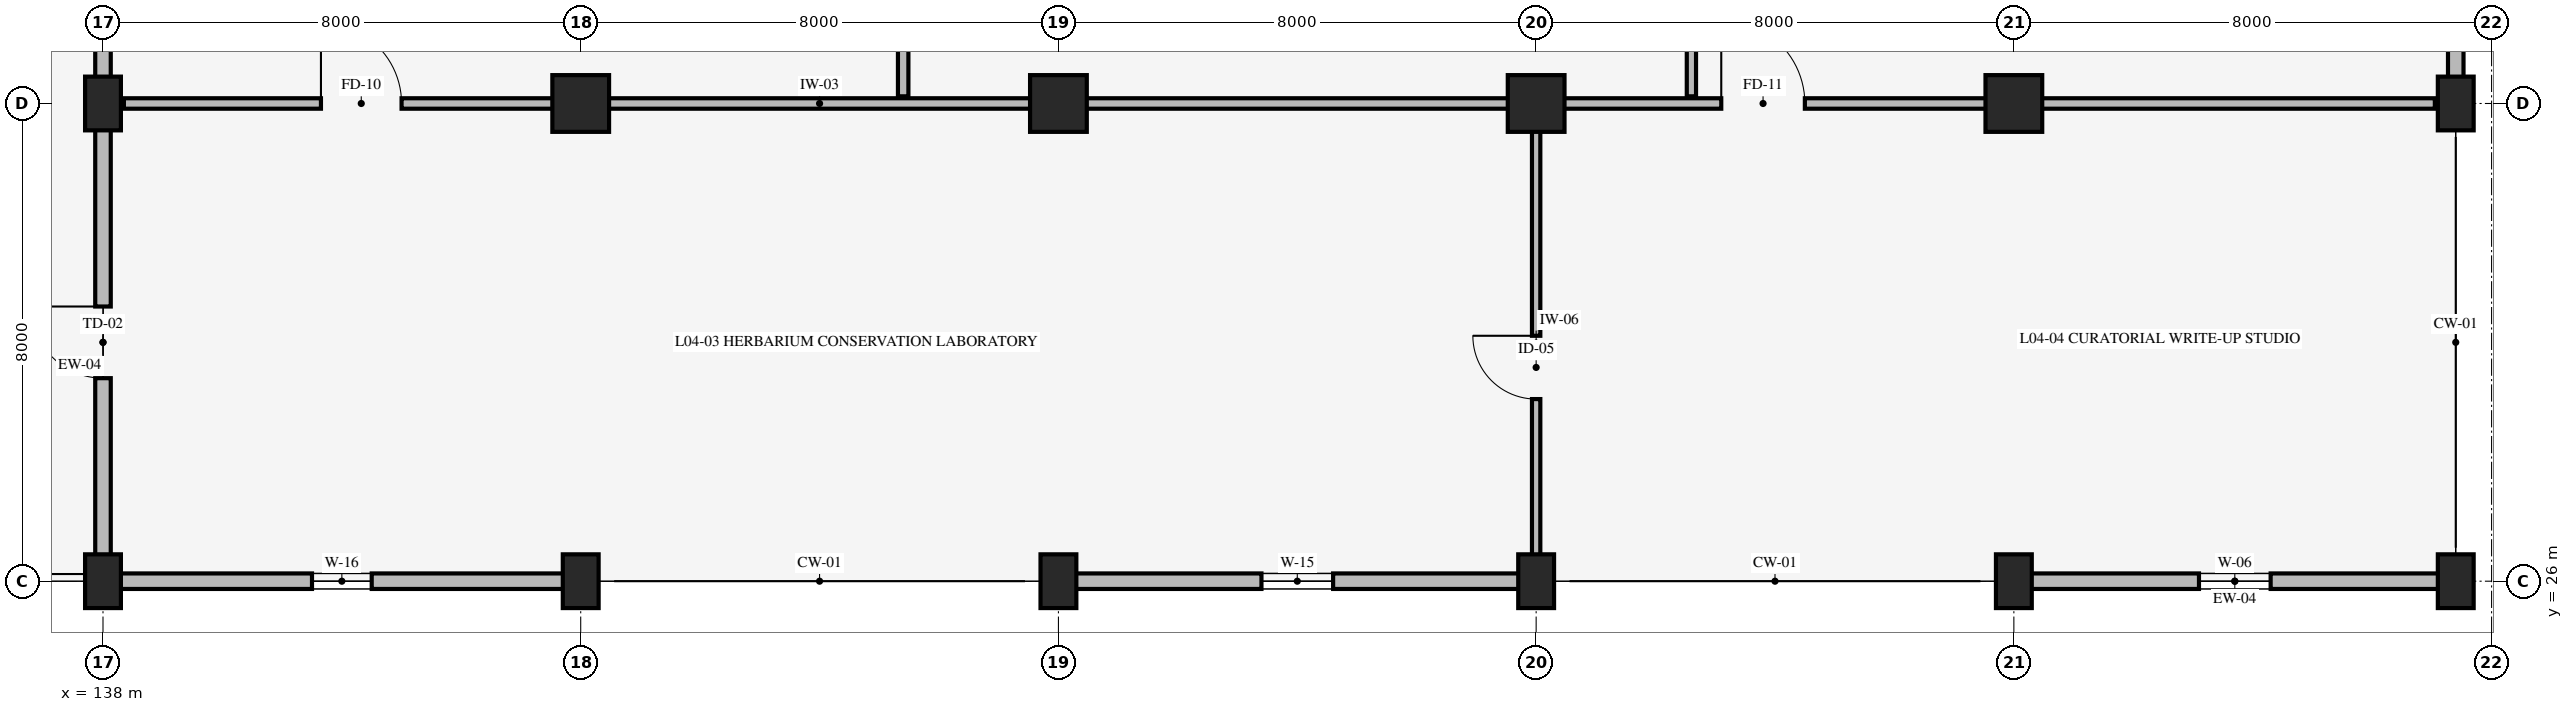
"""IFC4 building model, lengths in metres.
Left out: names, types, materials, properties, quantities, classifications, styles, units other than length and angle.
Written with IfcOpenShell. Run it as: python <this file> out.ifc"""

import sys

from ifc_helpers import new_model, si_unit, direction, frame, frame_2d, origin, origin_2d, place, context, subcontext, project, spatial, rectangle, extrude, element, fill, save


model = new_model("IFC4")
c1 = context("Model", 3, precision=1e-05, world=origin(), true_north=direction((0.0, 1.0)))
c2 = subcontext(c1, "Body", "Model", "MODEL_VIEW")
j1 = project(units=[si_unit("LENGTHUNIT", "METRE"), si_unit("PLANEANGLEUNIT", "RADIAN")], contexts=[c1])
p1 = place(None, origin())
s1 = spatial("IfcSite", under=j1, at=p1, CompositionType="ELEMENT")
p2 = place(p1, origin())
s2 = spatial("IfcBuilding", under=s1, at=p2, CompositionType="ELEMENT")
p3 = place(p2, frame((0.0, 0.0, 15.0)))
s3 = spatial("IfcBuildingStorey", under=s2, at=p3, CompositionType="ELEMENT", Elevation=15.0)
for number, where, z_axis, x_axis in (
    (1, (138.0, 26.0, 0.0), (0.0, 0.0, 1.0), (1.0, 0.0, 0.0)),
    (2, (138.0, 34.0, 0.0), (0.0, 0.0, 1.0), (1.0, 0.0, 0.0)),
    (3, (146.0, 26.0, 0.0), (0.0, 0.0, 1.0), (1.0, 0.0, 0.0)),
):
    element("IfcColumn", number, at=place(p3, frame(where, z_axis=z_axis, x_axis=x_axis)), inside=s3, PredefinedType="COLUMN", context=c2, shape_type="SweptSolid", body=[
        extrude(rectangle(XDim=0.6, YDim=0.9, at=origin_2d()), origin(), (0.0, 0.0, 1.0), 4.2),
    ])
p4 = place(p3, frame((146.0, 34.0, 0.0), z_axis=(0.0, 0.0, 1.0), x_axis=(1.0, 0.0, 0.0)))
e4 = element("IfcColumn", 4, at=p4, inside=s3, PredefinedType="COLUMN", context=c2, shape_type="SweptSolid", body=[
    extrude(rectangle(XDim=0.95, YDim=0.95, at=origin_2d()), origin(), (0.0, 0.0, 1.0), 4.2),
])
p5 = place(p3, frame((154.0, 26.0, 0.0), z_axis=(0.0, 0.0, 1.0), x_axis=(1.0, 0.0, 0.0)))
e5 = element("IfcColumn", 5, at=p5, inside=s3, PredefinedType="COLUMN", context=c2, shape_type="SweptSolid", body=[
    extrude(rectangle(XDim=0.6, YDim=0.9, at=origin_2d()), origin(), (0.0, 0.0, 1.0), 4.2),
])
p6 = place(p3, frame((154.0, 34.0, 0.0), z_axis=(0.0, 0.0, 1.0), x_axis=(1.0, 0.0, 0.0)))
e6 = element("IfcColumn", 6, at=p6, inside=s3, PredefinedType="COLUMN", context=c2, shape_type="SweptSolid", body=[
    extrude(rectangle(XDim=0.95, YDim=0.95, at=origin_2d()), origin(), (0.0, 0.0, 1.0), 4.2),
])
p7 = place(p3, frame((162.0, 26.0, 0.0), z_axis=(0.0, 0.0, 1.0), x_axis=(1.0, 0.0, 0.0)))
e7 = element("IfcColumn", 7, at=p7, inside=s3, PredefinedType="COLUMN", context=c2, shape_type="SweptSolid", body=[
    extrude(rectangle(XDim=0.6, YDim=0.9, at=origin_2d()), origin(), (0.0, 0.0, 1.0), 4.2),
])
p8 = place(p3, frame((162.0, 34.0, 0.0), z_axis=(0.0, 0.0, 1.0), x_axis=(1.0, 0.0, 0.0)))
e8 = element("IfcColumn", 8, at=p8, inside=s3, PredefinedType="COLUMN", context=c2, shape_type="SweptSolid", body=[
    extrude(rectangle(XDim=0.95, YDim=0.95, at=origin_2d()), origin(), (0.0, 0.0, 1.0), 4.2),
])
p9 = place(p3, frame((170.0, 26.0, 0.0), z_axis=(0.0, 0.0, 1.0), x_axis=(1.0, 0.0, 0.0)))
e9 = element("IfcColumn", 9, at=p9, inside=s3, PredefinedType="COLUMN", context=c2, shape_type="SweptSolid", body=[
    extrude(rectangle(XDim=0.6, YDim=0.9, at=origin_2d()), origin(), (0.0, 0.0, 1.0), 4.2),
])
p10 = place(p3, frame((170.0, 34.0, 0.0), z_axis=(0.0, 0.0, 1.0), x_axis=(1.0, 0.0, 0.0)))
e10 = element("IfcColumn", 10, at=p10, inside=s3, PredefinedType="COLUMN", context=c2, shape_type="SweptSolid", body=[
    extrude(rectangle(XDim=0.95, YDim=0.95, at=origin_2d()), origin(), (0.0, 0.0, 1.0), 4.2),
])
for number, where, z_axis, x_axis in (
    (11, (177.4, 26.0, 0.0), (0.0, 0.0, 1.0), (1.0, 0.0, 0.0)),
    (12, (177.4, 34.0, 0.0), (0.0, 0.0, 1.0), (1.0, 0.0, 0.0)),
):
    element("IfcColumn", number, at=place(p3, frame(where, z_axis=z_axis, x_axis=x_axis)), inside=s3, PredefinedType="COLUMN", context=c2, shape_type="SweptSolid", body=[
        extrude(rectangle(XDim=0.6, YDim=0.9, at=origin_2d()), origin(), (0.0, 0.0, 1.0), 4.2),
    ])
p11 = place(p3, frame((177.4, 26.0, 0.0), z_axis=(0.0, 0.0, 1.0), x_axis=(-1.0, 0.0, 0.0)))
e13 = element("IfcWall", 13, at=p11, inside=s3, PredefinedType="STANDARD", context=c2, shape_type="SweptSolid", body=[
    extrude(rectangle(XDim=7.4, YDim=0.26, at=frame_2d((3.7, 0.0))), origin(), (0.0, 0.0, 1.0), 3.03),
])
p12 = place(p11, frame((3.1, 0.0, 0.85)))
e14 = element("IfcOpeningElement", 14, at=p12, cuts=e13, PredefinedType="OPENING", context=c2, shape_type="SweptSolid", body=[
    extrude(rectangle(XDim=1.2, YDim=1.2, at=frame_2d((0.6, 0.6))), frame((0.0, 0.14, 0.0), z_axis=(0.0, -1.0, 0.0), x_axis=(1.0, 0.0, 0.0)), (0.0, 0.0, 1.0), 0.28),
])
p13 = place(p3, frame((162.0, 26.0, 0.0), z_axis=(0.0, 0.0, 1.0), x_axis=(-1.0, 0.0, 0.0)))
e15 = element("IfcWall", 15, at=p13, inside=s3, PredefinedType="STANDARD", context=c2, shape_type="SweptSolid", body=[
    extrude(rectangle(XDim=8.0, YDim=0.26, at=frame_2d((4.0, 0.0))), origin(), (0.0, 0.0, 1.0), 3.03),
])
p14 = place(p13, frame((3.4, 0.0, 0.85)))
e16 = element("IfcOpeningElement", 16, at=p14, cuts=e15, PredefinedType="OPENING", context=c2, shape_type="SweptSolid", body=[
    extrude(rectangle(XDim=1.2, YDim=1.8, at=frame_2d((0.6, 0.9))), frame((0.0, 0.14, 0.0), z_axis=(0.0, -1.0, 0.0), x_axis=(1.0, 0.0, 0.0)), (0.0, 0.0, 1.0), 0.28),
])
p15 = place(p3, frame((146.0, 26.0, 0.0), z_axis=(0.0, 0.0, 1.0), x_axis=(-1.0, 0.0, 0.0)))
e17 = element("IfcWall", 17, at=p15, inside=s3, PredefinedType="STANDARD", context=c2, shape_type="SweptSolid", body=[
    extrude(rectangle(XDim=8.0, YDim=0.26, at=frame_2d((4.0, 0.0))), origin(), (0.0, 0.0, 1.0), 3.33),
])
p16 = place(p15, frame((3.5, 0.0, 0.85)))
e18 = element("IfcOpeningElement", 18, at=p16, cuts=e17, PredefinedType="OPENING", context=c2, shape_type="SweptSolid", body=[
    extrude(rectangle(XDim=1.0, YDim=1.5, at=frame_2d((0.5, 0.75))), frame((0.0, 0.14, 0.0), z_axis=(0.0, -1.0, 0.0), x_axis=(1.0, 0.0, 0.0)), (0.0, 0.0, 1.0), 0.28),
])
p17 = place(p3, frame((138.0, 26.0, 0.0), z_axis=(0.0, 0.0, 1.0), x_axis=(0.0, 1.0, 0.0)))
e19 = element("IfcWall", 19, at=p17, inside=s3, PredefinedType="STANDARD", context=c2, shape_type="SweptSolid", body=[
    extrude(rectangle(XDim=8.0, YDim=0.26, at=frame_2d((4.0, 0.0))), origin(), (0.0, 0.0, 1.0), 3.08),
])
p18 = place(p17, frame((3.4, 0.0, 0.0)))
e20 = element("IfcOpeningElement", 20, at=p18, cuts=e19, PredefinedType="OPENING", context=c2, shape_type="SweptSolid", body=[
    extrude(rectangle(XDim=1.2, YDim=2.2, at=frame_2d((0.6, 1.1))), frame((0.0, 0.14, 0.0), z_axis=(0.0, -1.0, 0.0), x_axis=(1.0, 0.0, 0.0)), (0.0, 0.0, 1.0), 0.28),
])
p19 = place(p3, frame((138.0, 34.0, 0.0), z_axis=(0.0, 0.0, 1.0), x_axis=(0.0, 1.0, 0.0)))
e21 = element("IfcWall", 21, at=p19, inside=s3, PredefinedType="STANDARD", context=c2, shape_type="SweptSolid", body=[
    extrude(rectangle(XDim=8.0, YDim=0.26, at=frame_2d((4.0, 0.0))), origin(), (0.0, 0.0, 1.0), 3.08),
])
p20 = place(p19, frame((2.75, 0.0, 0.85)))
e22 = element("IfcOpeningElement", 22, at=p20, cuts=e21, PredefinedType="OPENING", context=c2, shape_type="SweptSolid", body=[
    extrude(rectangle(XDim=2.5, YDim=1.8, at=frame_2d((1.25, 0.9))), frame((0.0, 0.14, 0.0), z_axis=(0.0, -1.0, 0.0), x_axis=(1.0, 0.0, 0.0)), (0.0, 0.0, 1.0), 0.28),
])
p21 = place(p3, frame((177.4, 42.0, 0.0), z_axis=(0.0, 0.0, 1.0), x_axis=(0.0, -1.0, 0.0)))
e23 = element("IfcWall", 23, at=p21, inside=s3, PredefinedType="STANDARD", context=c2, shape_type="SweptSolid", body=[
    extrude(rectangle(XDim=8.0, YDim=0.26, at=frame_2d((4.0, 0.0))), origin(), (0.0, 0.0, 1.0), 3.08),
])
p22 = place(p21, frame((2.95, 0.0, 0.85)))
e24 = element("IfcOpeningElement", 24, at=p22, cuts=e23, PredefinedType="OPENING", context=c2, shape_type="SweptSolid", body=[
    extrude(rectangle(XDim=2.1, YDim=1.6, at=frame_2d((1.05, 0.8))), frame((0.0, 0.14, 0.0), z_axis=(0.0, -1.0, 0.0), x_axis=(1.0, 0.0, 0.0)), (0.0, 0.0, 1.0), 0.28),
])
p23 = place(p3, frame((151.4, 34.12, 0.0), z_axis=(0.0, 0.0, 1.0), x_axis=(0.0, 1.0, 0.0)))
e25 = element("IfcWall", 25, at=p23, inside=s3, PredefinedType="STANDARD", context=c2, shape_type="SweptSolid", body=[
    extrude(rectangle(XDim=19.76, YDim=0.175, at=frame_2d((9.88, 0.0))), origin(), (0.0, 0.0, 1.0), 3.9),
])
p24 = place(p23, frame((9.305, 0.0, 0.0)))
e26 = element("IfcOpeningElement", 26, at=p24, cuts=e25, PredefinedType="OPENING", context=c2, shape_type="SweptSolid", body=[
    extrude(rectangle(XDim=1.15, YDim=2.1, at=frame_2d((0.575, 1.05))), frame((0.0, 0.098, 0.0), z_axis=(0.0, -1.0, 0.0), x_axis=(1.0, 0.0, 0.0)), (0.0, 0.0, 1.0), 0.195),
])
p25 = place(p3, frame((164.6, 34.12, 0.0), z_axis=(0.0, 0.0, 1.0), x_axis=(0.0, 1.0, 0.0)))
e27 = element("IfcWall", 27, at=p25, inside=s3, PredefinedType="STANDARD", context=c2, shape_type="SweptSolid", body=[
    extrude(rectangle(XDim=15.8, YDim=0.155, at=frame_2d((7.9, 0.0))), origin(), (0.0, 0.0, 1.0), 3.9),
])
p26 = place(p25, frame((7.225, 0.0, 0.0)))
e28 = element("IfcOpeningElement", 28, at=p26, cuts=e27, PredefinedType="OPENING", context=c2, shape_type="SweptSolid", body=[
    extrude(rectangle(XDim=1.35, YDim=2.15, at=frame_2d((0.675, 1.075))), frame((0.0, 0.087, 0.0), z_axis=(0.0, -1.0, 0.0), x_axis=(1.0, 0.0, 0.0)), (0.0, 0.0, 1.0), 0.175),
])
p27 = place(p3, frame((138.35, 34.0, 0.0), z_axis=(0.0, 0.0, 1.0), x_axis=(1.0, 0.0, 0.0)))
e29 = element("IfcWall", 29, at=p27, inside=s3, PredefinedType="STANDARD", context=c2, shape_type="SweptSolid", body=[
    extrude(rectangle(XDim=23.3, YDim=0.175, at=frame_2d((11.65, 0.0))), origin(), (0.0, 0.0, 1.0), 3.03),
])
p28 = place(p27, frame((3.3, 0.0, 0.0)))
e30 = element("IfcOpeningElement", 30, at=p28, cuts=e29, PredefinedType="OPENING", context=c2, shape_type="SweptSolid", body=[
    extrude(rectangle(XDim=1.35, YDim=2.15, at=frame_2d((0.675, 1.075))), frame((0.0, 0.098, 0.0), z_axis=(0.0, -1.0, 0.0), x_axis=(1.0, 0.0, 0.0)), (0.0, 0.0, 1.0), 0.195),
])
p29 = place(p3, frame((162.0, 26.05, 0.0), z_axis=(0.0, 0.0, 1.0), x_axis=(0.0, 1.0, 0.0)))
e31 = element("IfcWall", 31, at=p29, inside=s3, PredefinedType="STANDARD", context=c2, shape_type="SweptSolid", body=[
    extrude(rectangle(XDim=7.83, YDim=0.14, at=frame_2d((3.915, 0.0))), origin(), (0.0, 0.0, 1.0), 3.08),
])
p30 = place(p29, frame((3.0, 0.0, 0.0)))
e32 = element("IfcOpeningElement", 32, at=p30, cuts=e31, PredefinedType="OPENING", context=c2, shape_type="SweptSolid", body=[
    extrude(rectangle(XDim=1.06, YDim=2.12, at=frame_2d((0.53, 1.06))), frame((0.0, 0.08, 0.0), z_axis=(0.0, -1.0, 0.0), x_axis=(1.0, 0.0, 0.0)), (0.0, 0.0, 1.0), 0.16),
])
p31 = place(p3, frame((162.35, 34.0, 0.0), z_axis=(0.0, 0.0, 1.0), x_axis=(1.0, 0.0, 0.0)))
e33 = element("IfcWall", 33, at=p31, inside=s3, PredefinedType="STANDARD", context=c2, shape_type="SweptSolid", body=[
    extrude(rectangle(XDim=14.7, YDim=0.175, at=frame_2d((7.35, 0.0))), origin(), (0.0, 0.0, 1.0), 3.03),
])
p32 = place(p31, frame((2.75, 0.0, 0.0)))
e34 = element("IfcOpeningElement", 34, at=p32, cuts=e33, PredefinedType="OPENING", context=c2, shape_type="SweptSolid", body=[
    extrude(rectangle(XDim=1.4, YDim=2.2, at=frame_2d((0.7, 1.1))), frame((0.0, 0.098, 0.0), z_axis=(0.0, -1.0, 0.0), x_axis=(1.0, 0.0, 0.0)), (0.0, 0.0, 1.0), 0.195),
])
p33 = place(p12, origin())
e35 = element("IfcWindow", 35, at=p33, inside=s3, PartitioningType="SINGLE_PANEL", PredefinedType="WINDOW", context=c2, shape_type="SweptSolid", body=[
    extrude(rectangle(XDim=1.2, YDim=1.2, at=frame_2d((0.6, 0.6))), frame((0.0, 0.03, 0.0), z_axis=(0.0, -1.0, 0.0), x_axis=(1.0, 0.0, 0.0)), (0.0, 0.0, 1.0), 0.06),
])
fill(e14, e35)
p34 = place(p14, origin())
e36 = element("IfcWindow", 36, at=p34, inside=s3, PartitioningType="SINGLE_PANEL", PredefinedType="WINDOW", context=c2, shape_type="SweptSolid", body=[
    extrude(rectangle(XDim=1.2, YDim=1.8, at=frame_2d((0.6, 0.9))), frame((0.0, 0.03, 0.0), z_axis=(0.0, -1.0, 0.0), x_axis=(1.0, 0.0, 0.0)), (0.0, 0.0, 1.0), 0.06),
])
fill(e16, e36)
p35 = place(p16, origin())
e37 = element("IfcWindow", 37, at=p35, inside=s3, PartitioningType="SINGLE_PANEL", PredefinedType="WINDOW", context=c2, shape_type="SweptSolid", body=[
    extrude(rectangle(XDim=1.0, YDim=1.5, at=frame_2d((0.5, 0.75))), frame((0.0, 0.03, 0.0), z_axis=(0.0, -1.0, 0.0), x_axis=(1.0, 0.0, 0.0)), (0.0, 0.0, 1.0), 0.06),
])
fill(e18, e37)
p36 = place(p18, origin())
e38 = element("IfcDoor", 38, at=p36, inside=s3, OperationType="SINGLE_SWING_RIGHT", PredefinedType="DOOR", context=c2, shape_type="SweptSolid", body=[
    extrude(rectangle(XDim=1.2, YDim=2.2, at=frame_2d((0.6, 1.1))), frame((0.0, 0.025, 0.0), z_axis=(0.0, -1.0, 0.0), x_axis=(1.0, 0.0, 0.0)), (0.0, 0.0, 1.0), 0.05),
])
fill(e20, e38)
p37 = place(p28, origin())
e39 = element("IfcDoor", 39, at=p37, inside=s3, OperationType="SINGLE_SWING_LEFT", PredefinedType="DOOR", context=c2, shape_type="SweptSolid", body=[
    extrude(rectangle(XDim=1.35, YDim=2.15, at=frame_2d((0.675, 1.075))), frame((0.0, 0.025, 0.0), z_axis=(0.0, -1.0, 0.0), x_axis=(1.0, 0.0, 0.0)), (0.0, 0.0, 1.0), 0.05),
])
fill(e30, e39)
p38 = place(p30, origin())
e40 = element("IfcDoor", 40, at=p38, inside=s3, OperationType="SINGLE_SWING_RIGHT", PredefinedType="DOOR", context=c2, shape_type="SweptSolid", body=[
    extrude(rectangle(XDim=1.06, YDim=2.12, at=frame_2d((0.53, 1.06))), frame((0.0, 0.025, 0.0), z_axis=(0.0, -1.0, 0.0), x_axis=(1.0, 0.0, 0.0)), (0.0, 0.0, 1.0), 0.05),
])
fill(e32, e40)
p39 = place(p32, origin())
e41 = element("IfcDoor", 41, at=p39, inside=s3, OperationType="SINGLE_SWING_LEFT", PredefinedType="DOOR", context=c2, shape_type="SweptSolid", body=[
    extrude(rectangle(XDim=1.4, YDim=2.2, at=frame_2d((0.7, 1.1))), frame((0.0, 0.025, 0.0), z_axis=(0.0, -1.0, 0.0), x_axis=(1.0, 0.0, 0.0)), (0.0, 0.0, 1.0), 0.05),
])
fill(e34, e41)
save(model, sys.argv[1])
